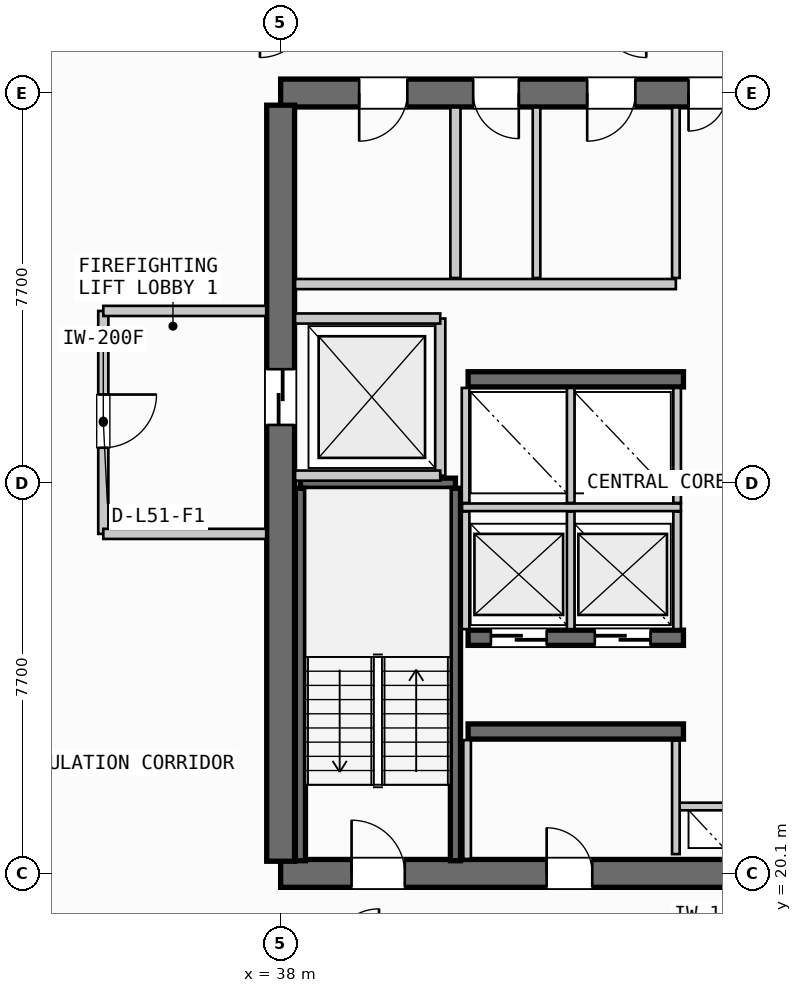
"""IFC4 building model, lengths in metres.
Left out: names, types, materials, properties, quantities, classifications, styles, units other than length and angle.
Written with IfcOpenShell. Run it as: python <this file> out.ifc"""

import sys

from ifc_helpers import new_model, si_unit, direction, frame, frame_2d, origin, place, context, subcontext, project, spatial, rectangle, extrude, source, transform, mapped, element, fill, save


model = new_model("IFC4")
c1 = context("Model", 3, precision=1e-05, world=origin(), true_north=direction((0.0, 1.0)))
c2 = subcontext(c1, "Body", "Model", "MODEL_VIEW")
j1 = project(units=[si_unit("LENGTHUNIT", "METRE"), si_unit("PLANEANGLEUNIT", "RADIAN")], contexts=[c1])
p1 = place(None, origin())
s1 = spatial("IfcSite", under=j1, at=p1, CompositionType="ELEMENT")
p2 = place(p1, origin())
s2 = spatial("IfcBuilding", under=s1, at=p2, CompositionType="ELEMENT")
p3 = place(p2, frame((0.0, 0.0, 197.4)))
s3 = spatial("IfcBuildingStorey", under=s2, at=p3, CompositionType="ELEMENT", Elevation=197.4)
p4 = place(p3, frame((38.0, 20.1, 0.0), z_axis=(0.0, 0.0, 1.0), x_axis=(1.0, 0.0, 0.0)))
e1 = element("IfcWall", 1, at=p4, inside=s3, PredefinedType="SHEAR", context=c2, shape_type="SweptSolid", body=[
    extrude(rectangle(XDim=17.6, YDim=0.55, at=frame_2d((8.8, 0.0))), origin(), (0.0, 0.0, 1.0), 3.26),
])
p5 = place(p4, frame((1.4, 0.0, 0.0)))
e2 = element("IfcOpeningElement", 2, at=p5, cuts=e1, PredefinedType="OPENING", context=c2, shape_type="SweptSolid", body=[
    extrude(rectangle(XDim=1.05, YDim=2.15, at=frame_2d((0.525, 1.075))), frame((0.0, 0.285, 0.0), z_axis=(0.0, -1.0, 0.0), x_axis=(1.0, 0.0, 0.0)), (0.0, 0.0, 1.0), 0.57),
])
p6 = place(p4, frame((15.15, 0.0, 0.0)))
e3 = element("IfcOpeningElement", 3, at=p6, cuts=e1, PredefinedType="OPENING", context=c2, shape_type="SweptSolid", body=[
    extrude(rectangle(XDim=1.05, YDim=2.15, at=frame_2d((0.525, 1.075))), frame((0.0, 0.285, 0.0), z_axis=(0.0, -1.0, 0.0), x_axis=(1.0, 0.0, 0.0)), (0.0, 0.0, 1.0), 0.57),
])
p7 = place(p4, frame((5.25, 0.0, 0.0)))
e4 = element("IfcOpeningElement", 4, at=p7, cuts=e1, PredefinedType="OPENING", context=c2, shape_type="SweptSolid", body=[
    extrude(rectangle(XDim=0.9, YDim=2.15, at=frame_2d((0.45, 1.075))), frame((0.0, 0.285, 0.0), z_axis=(0.0, -1.0, 0.0), x_axis=(1.0, 0.0, 0.0)), (0.0, 0.0, 1.0), 0.57),
])
p8 = place(p4, frame((11.4, 0.0, 0.0)))
e5 = element("IfcOpeningElement", 5, at=p8, cuts=e1, PredefinedType="OPENING", context=c2, shape_type="SweptSolid", body=[
    extrude(rectangle(XDim=0.95, YDim=2.15, at=frame_2d((0.475, 1.075))), frame((0.0, 0.285, 0.0), z_axis=(0.0, -1.0, 0.0), x_axis=(1.0, 0.0, 0.0)), (0.0, 0.0, 1.0), 0.57),
])
p9 = place(p3, frame((55.6, 35.5, 0.0), z_axis=(0.0, 0.0, 1.0), x_axis=(-1.0, 0.0, 0.0)))
e6 = element("IfcWall", 6, at=p9, inside=s3, PredefinedType="SHEAR", context=c2, shape_type="SweptSolid", body=[
    extrude(rectangle(XDim=17.6, YDim=0.55, at=frame_2d((8.8, 0.0))), origin(), (0.0, 0.0, 1.0), 3.26),
])
p10 = place(p9, frame((8.05, 0.0, 0.0)))
e7 = element("IfcOpeningElement", 7, at=p10, cuts=e6, PredefinedType="OPENING", context=c2, shape_type="SweptSolid", body=[
    extrude(rectangle(XDim=1.5, YDim=2.2, at=frame_2d((0.75, 1.1))), frame((0.0, 0.285, 0.0), z_axis=(0.0, -1.0, 0.0), x_axis=(1.0, 0.0, 0.0)), (0.0, 0.0, 1.0), 0.57),
])
p11 = place(p9, frame((15.1, 0.0, 0.0)))
e8 = element("IfcOpeningElement", 8, at=p11, cuts=e6, PredefinedType="OPENING", context=c2, shape_type="SweptSolid", body=[
    extrude(rectangle(XDim=0.95, YDim=2.15, at=frame_2d((0.475, 1.075))), frame((0.0, 0.285, 0.0), z_axis=(0.0, -1.0, 0.0), x_axis=(1.0, 0.0, 0.0)), (0.0, 0.0, 1.0), 0.57),
])
p12 = place(p9, frame((12.9, 0.0, 0.0)))
e9 = element("IfcOpeningElement", 9, at=p12, cuts=e6, PredefinedType="OPENING", context=c2, shape_type="SweptSolid", body=[
    extrude(rectangle(XDim=0.9, YDim=2.15, at=frame_2d((0.45, 1.075))), frame((0.0, 0.285, 0.0), z_axis=(0.0, -1.0, 0.0), x_axis=(1.0, 0.0, 0.0)), (0.0, 0.0, 1.0), 0.57),
])
p13 = place(p9, frame((10.6, 0.0, 0.0)))
e10 = element("IfcOpeningElement", 10, at=p13, cuts=e6, PredefinedType="OPENING", context=c2, shape_type="SweptSolid", body=[
    extrude(rectangle(XDim=0.95, YDim=2.15, at=frame_2d((0.475, 1.075))), frame((0.0, 0.285, 0.0), z_axis=(0.0, -1.0, 0.0), x_axis=(1.0, 0.0, 0.0)), (0.0, 0.0, 1.0), 0.57),
])
p14 = place(p3, frame((38.0, 35.26, 0.0), z_axis=(0.0, 0.0, 1.0), x_axis=(0.0, -1.0, 0.0)))
e11 = element("IfcWall", 11, at=p14, inside=s3, PredefinedType="SHEAR", context=c2, shape_type="SweptSolid", body=[
    extrude(rectangle(XDim=14.92, YDim=0.55, at=frame_2d((7.46, 0.0))), origin(), (0.0, 0.0, 1.0), 3.26),
])
p15 = place(p14, frame((5.21, 0.0, 0.0)))
e12 = element("IfcOpeningElement", 12, at=p15, cuts=e11, PredefinedType="OPENING", context=c2, shape_type="SweptSolid", body=[
    extrude(rectangle(XDim=1.1, YDim=2.2, at=frame_2d((0.55, 1.1))), frame((0.0, 0.285, 0.0), z_axis=(0.0, -1.0, 0.0), x_axis=(1.0, 0.0, 0.0)), (0.0, 0.0, 1.0), 0.57),
])
p16 = place(p3, frame((41.7, 22.9, 0.0), z_axis=(0.0, 0.0, 1.0), x_axis=(1.0, 0.0, 0.0)))
e13 = element("IfcWall", 13, at=p16, inside=s3, PredefinedType="SHEAR", context=c2, shape_type="SweptSolid", body=[
    extrude(rectangle(XDim=4.25, YDim=0.3, at=frame_2d((2.125, 0.0))), origin(), (0.0, 0.0, 1.0), 3.26),
])
p17 = place(p3, frame((41.7, 24.75, 0.0), z_axis=(0.0, 0.0, 1.0), x_axis=(1.0, 0.0, 0.0)))
e14 = element("IfcWall", 14, at=p17, inside=s3, PredefinedType="SHEAR", context=c2, shape_type="SweptSolid", body=[
    extrude(rectangle(XDim=4.25, YDim=0.3, at=frame_2d((2.125, 0.0))), origin(), (0.0, 0.0, 1.0), 3.26),
])
p18 = place(p17, frame((0.45, 0.0, 0.0)))
e15 = element("IfcOpeningElement", 15, at=p18, cuts=e14, PredefinedType="OPENING", context=c2, shape_type="SweptSolid", body=[
    extrude(rectangle(XDim=1.1, YDim=2.2, at=frame_2d((0.55, 1.1))), frame((0.0, 0.16, 0.0), z_axis=(0.0, -1.0, 0.0), x_axis=(1.0, 0.0, 0.0)), (0.0, 0.0, 1.0), 0.32),
])
p19 = place(p17, frame((2.5, 0.0, 0.0)))
e16 = element("IfcOpeningElement", 16, at=p19, cuts=e14, PredefinedType="OPENING", context=c2, shape_type="SweptSolid", body=[
    extrude(rectangle(XDim=1.1, YDim=2.2, at=frame_2d((0.55, 1.1))), frame((0.0, 0.16, 0.0), z_axis=(0.0, -1.0, 0.0), x_axis=(1.0, 0.0, 0.0)), (0.0, 0.0, 1.0), 0.32),
])
p20 = place(p3, frame((41.7, 29.85, 0.0), z_axis=(0.0, 0.0, 1.0), x_axis=(1.0, 0.0, 0.0)))
e17 = element("IfcWall", 17, at=p20, inside=s3, PredefinedType="SHEAR", context=c2, shape_type="SweptSolid", body=[
    extrude(rectangle(XDim=4.25, YDim=0.3, at=frame_2d((2.125, 0.0))), origin(), (0.0, 0.0, 1.0), 3.26),
])
p21 = place(p3, frame((38.39, 27.8, 0.0), z_axis=(0.0, 0.0, 1.0), x_axis=(1.0, 0.0, 0.0)))
e18 = element("IfcWall", 18, at=p21, inside=s3, PredefinedType="SHEAR", context=c2, shape_type="SweptSolid", body=[
    extrude(rectangle(XDim=3.06, YDim=0.2, at=frame_2d((1.53, 0.0))), origin(), (0.0, 0.0, 1.0), 3.26),
])
for number, where, z_axis, x_axis in (
    (19, (41.45, 27.7, 0.0), (0.0, 0.0, 1.0), (0.0, -1.0, 0.0)),
    (20, (38.39, 20.35, 0.0), (0.0, 0.0, 1.0), (0.0, 1.0, 0.0)),
):
    element("IfcWall", number, at=place(p3, frame(where, z_axis=z_axis, x_axis=x_axis)), inside=s3, PredefinedType="SHEAR", context=c2, shape_type="SweptSolid", body=[
        extrude(rectangle(XDim=7.35, YDim=0.2, at=frame_2d((3.675, 0.0))), origin(), (0.0, 0.0, 1.0), 3.26),
    ])
p22 = place(p3, frame((45.8, 21.42, 0.0), z_axis=(0.0, 0.0, 1.0), x_axis=(1.0, 0.0, 0.0)))
e21 = element("IfcWall", 21, at=p22, inside=s3, PredefinedType="PARTITIONING", context=c2, shape_type="SweptSolid", body=[
    extrude(rectangle(XDim=2.0, YDim=0.15, at=frame_2d((1.0, 0.0))), origin(), (0.0, 0.0, 1.0), 2.595),
])
p23 = place(p3, frame((45.8, 20.48, 0.0), z_axis=(0.0, 0.0, 1.0), x_axis=(0.0, 1.0, 0.0)))
e22 = element("IfcWall", 22, at=p23, inside=s3, PredefinedType="PARTITIONING", context=c2, shape_type="SweptSolid", body=[
    extrude(rectangle(XDim=2.24, YDim=0.15, at=frame_2d((1.12, 0.0))), origin(), (0.0, 0.0, 1.0), 2.595),
])
p24 = place(p3, frame((41.15, 27.95, 0.0), z_axis=(0.0, 0.0, 1.0), x_axis=(0.0, 1.0, 0.0)))
e23 = element("IfcWall", 23, at=p24, inside=s3, PredefinedType="PARTITIONING", context=c2, shape_type="SweptSolid", body=[
    extrude(rectangle(XDim=3.1, YDim=0.2, at=frame_2d((1.55, 0.0))), origin(), (0.0, 0.0, 1.0), 2.595),
])
for number, where, z_axis, x_axis in (
    (24, (38.285, 27.95, 0.0), (0.0, 0.0, 1.0), (1.0, 0.0, 0.0)),
    (25, (38.285, 31.05, 0.0), (0.0, 0.0, 1.0), (1.0, 0.0, 0.0)),
):
    element("IfcWall", number, at=place(p3, frame(where, z_axis=z_axis, x_axis=x_axis)), inside=s3, PredefinedType="PARTITIONING", context=c2, shape_type="SweptSolid", body=[
        extrude(rectangle(XDim=2.865, YDim=0.2, at=frame_2d((1.433, 0.0))), origin(), (0.0, 0.0, 1.0), 2.595),
    ])
p25 = place(p3, frame((34.5, 31.2, 0.0), z_axis=(0.0, 0.0, 1.0), x_axis=(0.0, -1.0, 0.0)))
e26 = element("IfcWall", 26, at=p25, inside=s3, PredefinedType="PARTITIONING", context=c2, shape_type="SweptSolid", body=[
    extrude(rectangle(XDim=4.4, YDim=0.2, at=frame_2d((2.2, 0.0))), origin(), (0.0, 0.0, 1.0), 2.595),
])
p26 = place(p25, frame((1.65, 0.0, 0.0)))
e27 = element("IfcOpeningElement", 27, at=p26, cuts=e26, PredefinedType="OPENING", context=c2, shape_type="SweptSolid", body=[
    extrude(rectangle(XDim=1.05, YDim=2.15, at=frame_2d((0.525, 1.075))), frame((0.0, 0.11, 0.0), z_axis=(0.0, -1.0, 0.0), x_axis=(1.0, 0.0, 0.0)), (0.0, 0.0, 1.0), 0.22),
])
for number, where, z_axis, x_axis in (
    (28, (34.5, 26.8, 0.0), (0.0, 0.0, 1.0), (1.0, 0.0, 0.0)),
    (29, (34.5, 31.2, 0.0), (0.0, 0.0, 1.0), (1.0, 0.0, 0.0)),
):
    element("IfcWall", number, at=place(p3, frame(where, z_axis=z_axis, x_axis=x_axis)), inside=s3, PredefinedType="PARTITIONING", context=c2, shape_type="SweptSolid", body=[
        extrude(rectangle(XDim=3.215, YDim=0.2, at=frame_2d((1.607, 0.0))), origin(), (0.0, 0.0, 1.0), 2.595),
    ])
p27 = place(p3, frame((41.68, 20.385, 0.0), z_axis=(0.0, 0.0, 1.0), x_axis=(0.0, 1.0, 0.0)))
e30 = element("IfcWall", 30, at=p27, inside=s3, PredefinedType="PARTITIONING", context=c2, shape_type="SweptSolid", body=[
    extrude(rectangle(XDim=2.345, YDim=0.15, at=frame_2d((1.172, 0.0))), origin(), (0.0, 0.0, 1.0), 2.595),
])
p28 = place(p3, frame((41.58, 27.325, 0.0), z_axis=(0.0, 0.0, 1.0), x_axis=(1.0, 0.0, 0.0)))
e31 = element("IfcWall", 31, at=p28, inside=s3, PredefinedType="PARTITIONING", context=c2, shape_type="SweptSolid", body=[
    extrude(rectangle(XDim=4.32, YDim=0.15, at=frame_2d((2.16, 0.0))), origin(), (0.0, 0.0, 1.0), 2.595),
])
for number, where, z_axis, x_axis in (
    (32, (41.65, 24.92, 0.0), (0.0, 0.0, 1.0), (0.0, 1.0, 0.0)),
    (33, (43.725, 24.92, 0.0), (0.0, 0.0, 1.0), (0.0, 1.0, 0.0)),
    (34, (45.825, 24.92, 0.0), (0.0, 0.0, 1.0), (0.0, 1.0, 0.0)),
):
    element("IfcWall", number, at=place(p3, frame(where, z_axis=z_axis, x_axis=x_axis)), inside=s3, PredefinedType="PARTITIONING", context=c2, shape_type="SweptSolid", body=[
        extrude(rectangle(XDim=2.32, YDim=0.15, at=frame_2d((1.16, 0.0))), origin(), (0.0, 0.0, 1.0), 2.595),
    ])
for number, where, z_axis, x_axis in (
    (35, (41.65, 27.41, 0.0), (0.0, 0.0, 1.0), (0.0, 1.0, 0.0)),
    (36, (43.725, 27.41, 0.0), (0.0, 0.0, 1.0), (0.0, 1.0, 0.0)),
    (37, (45.825, 27.41, 0.0), (0.0, 0.0, 1.0), (0.0, 1.0, 0.0)),
):
    element("IfcWall", number, at=place(p3, frame(where, z_axis=z_axis, x_axis=x_axis)), inside=s3, PredefinedType="PARTITIONING", context=c2, shape_type="SweptSolid", body=[
        extrude(rectangle(XDim=2.27, YDim=0.15, at=frame_2d((1.135, 0.0))), origin(), (0.0, 0.0, 1.0), 2.595),
    ])
p29 = place(p3, frame((41.45, 31.85, 0.0), z_axis=(0.0, 0.0, 1.0), x_axis=(0.0, 1.0, 0.0)))
e38 = element("IfcWall", 38, at=p29, inside=s3, PredefinedType="PARTITIONING", context=c2, shape_type="SweptSolid", body=[
    extrude(rectangle(XDim=3.365, YDim=0.2, at=frame_2d((1.683, 0.0))), origin(), (0.0, 0.0, 1.0), 2.595),
])
p30 = place(p3, frame((38.285, 31.73, 0.0), z_axis=(0.0, 0.0, 1.0), x_axis=(1.0, 0.0, 0.0)))
e39 = element("IfcWall", 39, at=p30, inside=s3, PredefinedType="PARTITIONING", context=c2, shape_type="SweptSolid", body=[
    extrude(rectangle(XDim=7.515, YDim=0.2, at=frame_2d((3.758, 0.0))), origin(), (0.0, 0.0, 1.0), 2.595),
])
p31 = place(p3, frame((45.8, 31.85, 0.0), z_axis=(0.0, 0.0, 1.0), x_axis=(0.0, 1.0, 0.0)))
e40 = element("IfcWall", 40, at=p31, inside=s3, PredefinedType="PARTITIONING", context=c2, shape_type="SweptSolid", body=[
    extrude(rectangle(XDim=3.365, YDim=0.15, at=frame_2d((1.683, 0.0))), origin(), (0.0, 0.0, 1.0), 2.595),
])
p32 = place(p3, frame((43.05, 31.85, 0.0), z_axis=(0.0, 0.0, 1.0), x_axis=(0.0, 1.0, 0.0)))
e41 = element("IfcWall", 41, at=p32, inside=s3, PredefinedType="PLUMBINGWALL", context=c2, shape_type="SweptSolid", body=[
    extrude(rectangle(XDim=3.365, YDim=0.15, at=frame_2d((1.683, 0.0))), origin(), (0.0, 0.0, 1.0), 2.595),
])
m1 = source(origin(), c2, "Body", "SweptSolid", [
    extrude(rectangle(XDim=1.05, YDim=2.15, at=frame_2d((0.525, 1.075))), frame((0.0, 0.025, 0.0), z_axis=(0.0, -1.0, 0.0), x_axis=(1.0, 0.0, 0.0)), (0.0, 0.0, 1.0), 0.05),
])
p33 = place(p5, origin())
e42 = element("IfcDoor", 42, at=p33, inside=s3, OperationType="SINGLE_SWING_LEFT", PredefinedType="DOOR", context=c2, shape_type="MappedRepresentation", body=[
    mapped(m1, transform((0.0, 0.0, 0.0), scale=1.0)),
])
fill(e2, e42)
m2 = source(origin(), c2, "Body", "SweptSolid", [
    extrude(rectangle(XDim=1.5, YDim=2.2, at=frame_2d((0.75, 1.1))), frame((0.0, 0.025, 0.0), z_axis=(0.0, -1.0, 0.0), x_axis=(1.0, 0.0, 0.0)), (0.0, 0.0, 1.0), 0.05),
])
p34 = place(p10, origin())
e43 = element("IfcDoor", 43, at=p34, inside=s3, OperationType="DOUBLE_DOOR_SINGLE_SWING", PredefinedType="DOOR", context=c2, shape_type="MappedRepresentation", body=[
    mapped(m2, transform((0.0, 0.0, 0.0), scale=1.0)),
])
fill(e7, e43)
m3 = source(origin(), c2, "Body", "SweptSolid", [
    extrude(rectangle(XDim=1.1, YDim=2.2, at=frame_2d((0.55, 1.1))), frame((0.0, 0.025, 0.0), z_axis=(0.0, -1.0, 0.0), x_axis=(1.0, 0.0, 0.0)), (0.0, 0.0, 1.0), 0.05),
])
p35 = place(p15, origin())
e44 = element("IfcDoor", 44, at=p35, inside=s3, OperationType="SLIDING_TO_LEFT", PredefinedType="DOOR", context=c2, shape_type="MappedRepresentation", body=[
    mapped(m3, transform((0.0, 0.0, 0.0), scale=1.0)),
])
fill(e12, e44)
m4 = source(origin(), c2, "Body", "SweptSolid", [
    extrude(rectangle(XDim=0.9, YDim=2.15, at=frame_2d((0.45, 1.075))), frame((0.0, 0.025, 0.0), z_axis=(0.0, -1.0, 0.0), x_axis=(1.0, 0.0, 0.0)), (0.0, 0.0, 1.0), 0.05),
])
p36 = place(p7, origin())
e45 = element("IfcDoor", 45, at=p36, inside=s3, OperationType="SINGLE_SWING_LEFT", PredefinedType="DOOR", context=c2, shape_type="MappedRepresentation", body=[
    mapped(m4, transform((0.0, 0.0, 0.0), scale=1.0)),
])
fill(e4, e45)
p37 = place(p18, origin())
e46 = element("IfcDoor", 46, at=p37, inside=s3, OperationType="SLIDING_TO_RIGHT", PredefinedType="DOOR", context=c2, shape_type="MappedRepresentation", body=[
    mapped(m3, transform((0.0, 0.0, 0.0), scale=1.0)),
])
fill(e15, e46)
p38 = place(p19, origin())
e47 = element("IfcDoor", 47, at=p38, inside=s3, OperationType="SLIDING_TO_RIGHT", PredefinedType="DOOR", context=c2, shape_type="MappedRepresentation", body=[
    mapped(m3, transform((0.0, 0.0, 0.0), scale=1.0)),
])
fill(e16, e47)
m5 = source(origin(), c2, "Body", "SweptSolid", [
    extrude(rectangle(XDim=0.95, YDim=2.15, at=frame_2d((0.475, 1.075))), frame((0.0, 0.025, 0.0), z_axis=(0.0, -1.0, 0.0), x_axis=(1.0, 0.0, 0.0)), (0.0, 0.0, 1.0), 0.05),
])
p39 = place(p11, origin())
e48 = element("IfcDoor", 48, at=p39, inside=s3, OperationType="SINGLE_SWING_RIGHT", PredefinedType="DOOR", context=c2, shape_type="MappedRepresentation", body=[
    mapped(m5, transform((0.0, 0.0, 0.0), scale=1.0)),
])
fill(e8, e48)
p40 = place(p12, origin())
e49 = element("IfcDoor", 49, at=p40, inside=s3, OperationType="SINGLE_SWING_LEFT", PredefinedType="DOOR", context=c2, shape_type="MappedRepresentation", body=[
    mapped(m4, transform((0.0, 0.0, 0.0), scale=1.0)),
])
fill(e9, e49)
p41 = place(p13, origin())
e50 = element("IfcDoor", 50, at=p41, inside=s3, OperationType="SINGLE_SWING_RIGHT", PredefinedType="DOOR", context=c2, shape_type="MappedRepresentation", body=[
    mapped(m5, transform((0.0, 0.0, 0.0), scale=1.0)),
])
fill(e10, e50)
p42 = place(p26, origin())
e51 = element("IfcDoor", 51, at=p42, inside=s3, OperationType="SINGLE_SWING_LEFT", PredefinedType="DOOR", context=c2, shape_type="MappedRepresentation", body=[
    mapped(m1, transform((0.0, 0.0, 0.0), scale=1.0)),
])
fill(e27, e51)
save(model, sys.argv[1])
